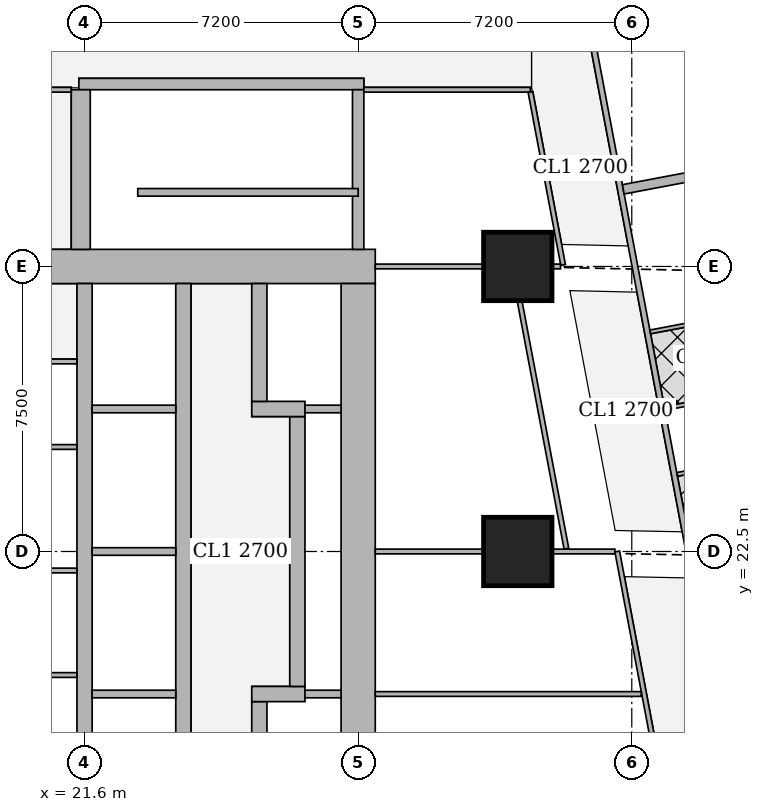
"""IFC4 building model, lengths in metres.
Left out: names, types, materials, properties, quantities, classifications, styles, units other than length and angle.
Written with IfcOpenShell. Run it as: python <this file> out.ifc"""

import sys

from ifc_helpers import new_model, si_unit, direction, frame, frame_2d, origin, origin_2d, place, context, subcontext, project, spatial, rectangle, extrude, element, fill, save


model = new_model("IFC4")
c1 = context("Model", 3, precision=1e-05, world=origin(), true_north=direction((0.0, 1.0)))
c2 = subcontext(c1, "Body", "Model", "MODEL_VIEW")
j1 = project(units=[si_unit("LENGTHUNIT", "METRE"), si_unit("PLANEANGLEUNIT", "RADIAN")], contexts=[c1])
p1 = place(None, origin())
s1 = spatial("IfcSite", under=j1, at=p1, CompositionType="ELEMENT")
p2 = place(p1, origin())
s2 = spatial("IfcBuilding", under=s1, at=p2, CompositionType="ELEMENT")
p3 = place(p2, frame((0.0, 0.0, 20.0)))
s3 = spatial("IfcBuildingStorey", under=s2, at=p3, CompositionType="ELEMENT", Elevation=20.0)
for number, where, z_axis, x_axis in (
    (1, (33.0, 22.5, 0.0), (0.0, 0.0, 1.0), (1.0, 0.0, 0.0)),
    (2, (33.0, 30.0, 0.0), (0.0, 0.0, 1.0), (1.0, 0.0, 0.0)),
):
    element("IfcColumn", number, at=place(p3, frame(where, z_axis=z_axis, x_axis=x_axis)), inside=s3, PredefinedType="COLUMN", context=c2, shape_type="SweptSolid", body=[
        extrude(rectangle(XDim=1.8, YDim=1.8, at=origin_2d()), origin(), (0.0, 0.0, 1.0), 3.75),
    ])
p4 = place(p3, frame((13.95, 30.0, 0.0), z_axis=(0.0, 0.0, 1.0), x_axis=(1.0, 0.0, 0.0)))
e3 = element("IfcWall", 3, at=p4, inside=s3, PredefinedType="SHEAR", context=c2, shape_type="SweptSolid", body=[
    extrude(rectangle(XDim=15.3, YDim=0.9, at=frame_2d((7.65, 0.0))), origin(), (0.0, 0.0, 1.0), 3.75),
])
p5 = place(p4, frame((4.45, 0.0, 0.0)))
e4 = element("IfcOpeningElement", 4, at=p5, cuts=e3, PredefinedType="OPENING", context=c2, shape_type="SweptSolid", body=[
    extrude(rectangle(XDim=1.8, YDim=2.1, at=frame_2d((0.9, 1.05))), frame((0.0, 0.46, 0.0), z_axis=(0.0, -1.0, 0.0), x_axis=(1.0, 0.0, 0.0)), (0.0, 0.0, 1.0), 0.92),
])
p6 = place(p4, frame((10.7, 0.0, 0.0)))
e5 = element("IfcOpeningElement", 5, at=p6, cuts=e3, PredefinedType="OPENING", context=c2, shape_type="SweptSolid", body=[
    extrude(rectangle(XDim=1.1, YDim=2.1, at=frame_2d((0.55, 1.05))), frame((0.0, 0.46, 0.0), z_axis=(0.0, -1.0, 0.0), x_axis=(1.0, 0.0, 0.0)), (0.0, 0.0, 1.0), 0.92),
])
p7 = place(p3, frame((28.8, 15.45, 0.0), z_axis=(0.0, 0.0, 1.0), x_axis=(0.0, 1.0, 0.0)))
e6 = element("IfcWall", 6, at=p7, inside=s3, PredefinedType="SHEAR", context=c2, shape_type="SweptSolid", body=[
    extrude(rectangle(XDim=14.1, YDim=0.9, at=frame_2d((7.05, 0.0))), origin(), (0.0, 0.0, 1.0), 3.75),
])
for number, where, z_axis, x_axis in (
    (7, (21.6, 15.45, 0.0), (0.0, 0.0, 1.0), (0.0, 1.0, 0.0)),
    (8, (24.2, 15.45, 0.0), (0.0, 0.0, 1.0), (0.0, 1.0, 0.0)),
):
    element("IfcWall", number, at=place(p3, frame(where, z_axis=z_axis, x_axis=x_axis)), inside=s3, PredefinedType="SHEAR", context=c2, shape_type="SweptSolid", body=[
        extrude(rectangle(XDim=14.1, YDim=0.4, at=frame_2d((7.05, 0.0))), origin(), (0.0, 0.0, 1.0), 3.75),
    ])
p8 = place(p3, frame((26.2, 15.45, 0.0), z_axis=(0.0, 0.0, 1.0), x_axis=(0.0, 1.0, 0.0)))
e9 = element("IfcWall", 9, at=p8, inside=s3, PredefinedType="SHEAR", context=c2, shape_type="SweptSolid", body=[
    extrude(rectangle(XDim=3.1, YDim=0.4, at=frame_2d((1.55, 0.0))), origin(), (0.0, 0.0, 1.0), 3.75),
])
p9 = place(p8, frame((0.825, 0.0, 0.0)))
e10 = element("IfcOpeningElement", 10, at=p9, cuts=e9, PredefinedType="OPENING", context=c2, shape_type="SweptSolid", body=[
    extrude(rectangle(XDim=1.2, YDim=2.1, at=frame_2d((0.6, 1.05))), frame((0.0, 0.21, 0.0), z_axis=(0.0, -1.0, 0.0), x_axis=(1.0, 0.0, 0.0)), (0.0, 0.0, 1.0), 0.42),
])
p10 = place(p3, frame((26.0, 18.75, 0.0), z_axis=(0.0, 0.0, 1.0), x_axis=(1.0, 0.0, 0.0)))
e11 = element("IfcWall", 11, at=p10, inside=s3, PredefinedType="SHEAR", context=c2, shape_type="SweptSolid", body=[
    extrude(rectangle(XDim=1.4, YDim=0.4, at=frame_2d((0.7, 0.0))), origin(), (0.0, 0.0, 1.0), 3.75),
])
p11 = place(p3, frame((27.2, 18.95, 0.0), z_axis=(0.0, 0.0, 1.0), x_axis=(0.0, 1.0, 0.0)))
e12 = element("IfcWall", 12, at=p11, inside=s3, PredefinedType="SHEAR", context=c2, shape_type="SweptSolid", body=[
    extrude(rectangle(XDim=7.1, YDim=0.4, at=frame_2d((3.55, 0.0))), origin(), (0.0, 0.0, 1.0), 3.75),
])
p12 = place(p3, frame((26.0, 26.25, 0.0), z_axis=(0.0, 0.0, 1.0), x_axis=(1.0, 0.0, 0.0)))
e13 = element("IfcWall", 13, at=p12, inside=s3, PredefinedType="SHEAR", context=c2, shape_type="SweptSolid", body=[
    extrude(rectangle(XDim=1.4, YDim=0.4, at=frame_2d((0.7, 0.0))), origin(), (0.0, 0.0, 1.0), 3.75),
])
p13 = place(p3, frame((26.2, 26.45, 0.0), z_axis=(0.0, 0.0, 1.0), x_axis=(0.0, 1.0, 0.0)))
e14 = element("IfcWall", 14, at=p13, inside=s3, PredefinedType="SHEAR", context=c2, shape_type="SweptSolid", body=[
    extrude(rectangle(XDim=3.1, YDim=0.4, at=frame_2d((1.55, 0.0))), origin(), (0.0, 0.0, 1.0), 3.75),
])
p14 = place(p13, frame((1.075, 0.0, 0.0)))
e15 = element("IfcOpeningElement", 15, at=p14, cuts=e14, PredefinedType="OPENING", context=c2, shape_type="SweptSolid", body=[
    extrude(rectangle(XDim=1.2, YDim=2.1, at=frame_2d((0.6, 1.05))), frame((0.0, 0.21, 0.0), z_axis=(0.0, -1.0, 0.0), x_axis=(1.0, 0.0, 0.0)), (0.0, 0.0, 1.0), 0.42),
])
p15 = place(p3, frame((21.45, 34.8, 0.0), z_axis=(0.0, 0.0, 1.0), x_axis=(1.0, 0.0, 0.0)))
e16 = element("IfcWall", 16, at=p15, inside=s3, PredefinedType="SHEAR", context=c2, shape_type="SweptSolid", body=[
    extrude(rectangle(XDim=7.5, YDim=0.3, at=frame_2d((3.75, 0.0))), origin(), (0.0, 0.0, 1.0), 3.75),
])
p16 = place(p15, frame((0.5, 0.0, 0.0)))
e17 = element("IfcOpeningElement", 17, at=p16, cuts=e16, PredefinedType="OPENING", context=c2, shape_type="SweptSolid", body=[
    extrude(rectangle(XDim=1.1, YDim=2.1, at=frame_2d((0.55, 1.05))), frame((0.0, 0.16, 0.0), z_axis=(0.0, -1.0, 0.0), x_axis=(1.0, 0.0, 0.0)), (0.0, 0.0, 1.0), 0.32),
])
p17 = place(p3, frame((21.5, 30.45, 0.0), z_axis=(0.0, 0.0, 1.0), x_axis=(0.0, 1.0, 0.0)))
e18 = element("IfcWall", 18, at=p17, inside=s3, PredefinedType="SHEAR", context=c2, shape_type="SweptSolid", body=[
    extrude(rectangle(XDim=4.2, YDim=0.5, at=frame_2d((2.1, 0.0))), origin(), (0.0, 0.0, 1.0), 3.75),
])
p18 = place(p3, frame((28.8, 30.45, 0.0), z_axis=(0.0, 0.0, 1.0), x_axis=(0.0, 1.0, 0.0)))
e19 = element("IfcWall", 19, at=p18, inside=s3, PredefinedType="SHEAR", context=c2, shape_type="SweptSolid", body=[
    extrude(rectangle(XDim=4.2, YDim=0.3, at=frame_2d((2.1, 0.0))), origin(), (0.0, 0.0, 1.0), 3.75),
])
p19 = place(p3, frame((33.755, 42.325, 0.0), z_axis=(0.0, 0.0, 1.0), x_axis=(0.185611461091, -0.982623216453, 0.0)))
e20 = element("IfcWall", 20, at=p19, inside=s3, PredefinedType="SOLIDWALL", context=c2, shape_type="SweptSolid", body=[
    extrude(rectangle(XDim=40.241, YDim=0.15, at=frame_2d((20.121, 0.0))), origin(), (0.0, 0.0, 1.0), 2.5),
])
p20 = place(p19, frame((7.325, 0.0, 0.0)))
e21 = element("IfcOpeningElement", 21, at=p20, cuts=e20, PredefinedType="OPENING", context=c2, shape_type="SweptSolid", body=[
    extrude(rectangle(XDim=1.0, YDim=2.1, at=frame_2d((0.5, 1.05))), frame((0.0, 0.085, 0.0), z_axis=(0.0, -1.0, 0.0), x_axis=(1.0, 0.0, 0.0)), (0.0, 0.0, 1.0), 0.17),
])
p21 = place(p19, frame((11.902, 0.0, 0.0)))
e22 = element("IfcOpeningElement", 22, at=p21, cuts=e20, PredefinedType="OPENING", context=c2, shape_type="SweptSolid", body=[
    extrude(rectangle(XDim=1.0, YDim=2.1, at=frame_2d((0.5, 1.05))), frame((0.0, 0.085, 0.0), z_axis=(0.0, -1.0, 0.0), x_axis=(1.0, 0.0, 0.0)), (0.0, 0.0, 1.0), 0.17),
])
p22 = place(p19, frame((25.718, 0.0, 0.0)))
e23 = element("IfcOpeningElement", 23, at=p22, cuts=e20, PredefinedType="OPENING", context=c2, shape_type="SweptSolid", body=[
    extrude(rectangle(XDim=1.0, YDim=2.1, at=frame_2d((0.5, 1.05))), frame((0.0, 0.085, 0.0), z_axis=(0.0, -1.0, 0.0), x_axis=(1.0, 0.0, 0.0)), (0.0, 0.0, 1.0), 0.17),
])
p23 = place(p19, frame((31.788, 0.0, 0.0)))
e24 = element("IfcOpeningElement", 24, at=p23, cuts=e20, PredefinedType="OPENING", context=c2, shape_type="SweptSolid", body=[
    extrude(rectangle(XDim=1.0, YDim=2.1, at=frame_2d((0.5, 1.05))), frame((0.0, 0.085, 0.0), z_axis=(0.0, -1.0, 0.0), x_axis=(1.0, 0.0, 0.0)), (0.0, 0.0, 1.0), 0.17),
])
for number, where, z_axis, x_axis in (
    (25, (39.948, 28.933, 0.0), (0.0, 0.0, 1.0), (-0.983, -0.186, 0.0)),
    (26, (40.656, 25.183, 0.0), (0.0, 0.0, 1.0), (-0.983, -0.186, 0.0)),
):
    element("IfcWall", number, at=place(p3, frame(where, z_axis=z_axis, x_axis=x_axis)), inside=s3, PredefinedType="PARTITIONING", context=c2, shape_type="SweptSolid", body=[
        extrude(rectangle(XDim=3.524, YDim=0.1, at=frame_2d((1.762, 0.0))), origin(), (0.0, 0.0, 1.0), 3.5),
    ])
p24 = place(p3, frame((40.329, 26.918, 0.0), z_axis=(0.0, 0.0, 1.0), x_axis=(-0.982638553676, -0.185530247748, 0.0)))
e27 = element("IfcWall", 27, at=p24, inside=s3, PredefinedType="PARTITIONING", context=c2, shape_type="SweptSolid", body=[
    extrude(rectangle(XDim=3.525, YDim=0.1, at=frame_2d((1.763, 0.0))), origin(), (0.0, 0.0, 1.0), 3.5),
])
p25 = place(p3, frame((40.468, 32.915, 0.0), z_axis=(0.0, 0.0, 1.0), x_axis=(-0.982635807605, -0.185544791394, 0.0)))
e28 = element("IfcWall", 28, at=p25, inside=s3, PredefinedType="SOLIDWALL", context=c2, shape_type="SweptSolid", body=[
    extrude(rectangle(XDim=4.775, YDim=0.25, at=frame_2d((2.388, 0.0))), origin(), (0.0, 0.0, 1.0), 3.5),
])
p26 = place(p3, frame((10.413, 34.65, 0.0), z_axis=(0.0, 0.0, 1.0), x_axis=(1.0, 0.0, 0.0)))
e29 = element("IfcWall", 29, at=p26, inside=s3, PredefinedType="PARTITIONING", context=c2, shape_type="SweptSolid", body=[
    extrude(rectangle(XDim=10.837, YDim=0.125, at=frame_2d((5.418, 0.0))), origin(), (0.0, 0.0, 1.0), 3.5),
])
p27 = place(p26, frame((7.487, 0.0, 0.0)))
e30 = element("IfcOpeningElement", 30, at=p27, cuts=e29, PredefinedType="OPENING", context=c2, shape_type="SweptSolid", body=[
    extrude(rectangle(XDim=1.8, YDim=2.1, at=frame_2d((0.9, 1.05))), frame((0.0, 0.073, 0.0), z_axis=(0.0, -1.0, 0.0), x_axis=(1.0, 0.0, 0.0)), (0.0, 0.0, 1.0), 0.145),
])
p28 = place(p3, frame((28.95, 34.65, 0.0), z_axis=(0.0, 0.0, 1.0), x_axis=(1.0, 0.0, 0.0)))
e31 = element("IfcWall", 31, at=p28, inside=s3, PredefinedType="PARTITIONING", context=c2, shape_type="SweptSolid", body=[
    extrude(rectangle(XDim=4.381, YDim=0.125, at=frame_2d((2.19, 0.0))), origin(), (0.0, 0.0, 1.0), 3.5),
])
p29 = place(p3, frame((36.861, 15.913, 0.0), z_axis=(0.0, 0.0, 1.0), x_axis=(-0.185598960122, 0.982625577726, 0.0)))
e32 = element("IfcWall", 32, at=p29, inside=s3, PredefinedType="PARTITIONING", context=c2, shape_type="SweptSolid", body=[
    extrude(rectangle(XDim=6.703, YDim=0.125, at=frame_2d((3.352, 0.0))), origin(), (0.0, 0.0, 1.0), 2.5),
])
p30 = place(p29, frame((0.25, 0.0, 0.0)))
e33 = element("IfcOpeningElement", 33, at=p30, cuts=e32, PredefinedType="OPENING", context=c2, shape_type="SweptSolid", body=[
    extrude(rectangle(XDim=1.0, YDim=2.1, at=frame_2d((0.5, 1.05))), frame((0.0, 0.073, 0.0), z_axis=(0.0, -1.0, 0.0), x_axis=(1.0, 0.0, 0.0)), (0.0, 0.0, 1.0), 0.145),
])
p31 = place(p29, frame((3.71, 0.0, 0.0)))
e34 = element("IfcOpeningElement", 34, at=p31, cuts=e32, PredefinedType="OPENING", context=c2, shape_type="SweptSolid", body=[
    extrude(rectangle(XDim=1.0, YDim=2.1, at=frame_2d((0.5, 1.05))), frame((0.0, 0.073, 0.0), z_axis=(0.0, -1.0, 0.0), x_axis=(1.0, 0.0, 0.0)), (0.0, 0.0, 1.0), 0.145),
])
p32 = place(p3, frame((34.193, 30.04, 0.0), z_axis=(0.0, 0.0, 1.0), x_axis=(-0.185626015863, 0.982620467034, 0.0)))
e35 = element("IfcWall", 35, at=p32, inside=s3, PredefinedType="PARTITIONING", context=c2, shape_type="SweptSolid", body=[
    extrude(rectangle(XDim=4.628, YDim=0.125, at=frame_2d((2.314, 0.0))), origin(), (0.0, 0.0, 1.0), 2.5),
])
p33 = place(p32, frame((1.15, 0.0, 0.0)))
e36 = element("IfcOpeningElement", 36, at=p33, cuts=e35, PredefinedType="OPENING", context=c2, shape_type="SweptSolid", body=[
    extrude(rectangle(XDim=1.0, YDim=2.1, at=frame_2d((0.5, 1.05))), frame((0.0, 0.073, 0.0), z_axis=(0.0, -1.0, 0.0), x_axis=(1.0, 0.0, 0.0)), (0.0, 0.0, 1.0), 0.145),
])
p34 = place(p3, frame((34.28, 22.574, 0.0), z_axis=(0.0, 0.0, 1.0), x_axis=(-0.185713862218, 0.982603867986, 0.0)))
e37 = element("IfcWall", 37, at=p34, inside=s3, PredefinedType="PARTITIONING", context=c2, shape_type="SweptSolid", body=[
    extrude(rectangle(XDim=6.628, YDim=0.125, at=frame_2d((3.314, 0.0))), origin(), (0.0, 0.0, 1.0), 2.5),
])
p35 = place(p34, frame((3.241, 0.0, 0.0)))
e38 = element("IfcOpeningElement", 38, at=p35, cuts=e37, PredefinedType="OPENING", context=c2, shape_type="SweptSolid", body=[
    extrude(rectangle(XDim=1.0, YDim=2.1, at=frame_2d((0.5, 1.05))), frame((0.0, 0.073, 0.0), z_axis=(0.0, -1.0, 0.0), x_axis=(1.0, 0.0, 0.0)), (0.0, 0.0, 1.0), 0.145),
])
p36 = place(p3, frame((29.25, 18.75, 0.0), z_axis=(0.0, 0.0, 1.0), x_axis=(1.0, 0.0, 0.0)))
e39 = element("IfcWall", 39, at=p36, inside=s3, PredefinedType="PARTITIONING", context=c2, shape_type="SweptSolid", body=[
    extrude(rectangle(XDim=7.0, YDim=0.125, at=frame_2d((3.5, 0.0))), origin(), (0.0, 0.0, 1.0), 3.5),
])
p37 = place(p3, frame((29.25, 22.5, 0.0), z_axis=(0.0, 0.0, 1.0), x_axis=(1.0, 0.0, 0.0)))
e40 = element("IfcWall", 40, at=p37, inside=s3, PredefinedType="PARTITIONING", context=c2, shape_type="SweptSolid", body=[
    extrude(rectangle(XDim=2.849, YDim=0.125, at=frame_2d((1.425, 0.0))), origin(), (0.0, 0.0, 1.0), 3.5),
])
p38 = place(p3, frame((33.901, 22.5, 0.0), z_axis=(0.0, 0.0, 1.0), x_axis=(1.0, 0.0, 0.0)))
e41 = element("IfcWall", 41, at=p38, inside=s3, PredefinedType="PARTITIONING", context=c2, shape_type="SweptSolid", body=[
    extrude(rectangle(XDim=1.655, YDim=0.125, at=frame_2d((0.828, 0.0))), origin(), (0.0, 0.0, 1.0), 2.5),
])
p39 = place(p3, frame((29.25, 30.0, 0.0), z_axis=(0.0, 0.0, 1.0), x_axis=(1.0, 0.0, 0.0)))
e42 = element("IfcWall", 42, at=p39, inside=s3, PredefinedType="PARTITIONING", context=c2, shape_type="SweptSolid", body=[
    extrude(rectangle(XDim=2.849, YDim=0.125, at=frame_2d((1.425, 0.0))), origin(), (0.0, 0.0, 1.0), 3.5),
])
p40 = place(p3, frame((33.901, 30.0, 0.0), z_axis=(0.0, 0.0, 1.0), x_axis=(1.0, 0.0, 0.0)))
e43 = element("IfcWall", 43, at=p40, inside=s3, PredefinedType="PARTITIONING", context=c2, shape_type="SweptSolid", body=[
    extrude(rectangle(XDim=0.224, YDim=0.125, at=frame_2d((0.112, 0.0))), origin(), (0.0, 0.0, 1.0), 2.5),
])
for number, where, z_axis, x_axis in (
    (44, (20.363, 27.5, 0.0), (0.0, 0.0, 1.0), (1.0, 0.0, 0.0)),
    (45, (20.363, 19.25, 0.0), (0.0, 0.0, 1.0), (1.0, 0.0, 0.0)),
    (46, (20.363, 22.0, 0.0), (0.0, 0.0, 1.0), (1.0, 0.0, 0.0)),
    (47, (20.363, 25.25, 0.0), (0.0, 0.0, 1.0), (1.0, 0.0, 0.0)),
):
    element("IfcWall", number, at=place(p3, frame(where, z_axis=z_axis, x_axis=x_axis)), inside=s3, PredefinedType="PARTITIONING", context=c2, shape_type="SweptSolid", body=[
        extrude(rectangle(XDim=1.037, YDim=0.125, at=frame_2d((0.519, 0.0))), origin(), (0.0, 0.0, 1.0), 3.5),
    ])
p41 = place(p3, frame((23.0, 31.95, 0.0), z_axis=(0.0, 0.0, 1.0), x_axis=(1.0, 0.0, 0.0)))
e48 = element("IfcWall", 48, at=p41, inside=s3, PredefinedType="SHEAR", context=c2, shape_type="SweptSolid", body=[
    extrude(rectangle(XDim=5.8, YDim=0.2, at=frame_2d((2.9, 0.0))), origin(), (0.0, 0.0, 1.0), 3.75),
])
for number, where, z_axis, x_axis in (
    (49, (21.8, 18.75, 0.0), (0.0, 0.0, 1.0), (1.0, 0.0, 0.0)),
    (50, (21.8, 22.5, 0.0), (0.0, 0.0, 1.0), (1.0, 0.0, 0.0)),
    (51, (21.8, 26.25, 0.0), (0.0, 0.0, 1.0), (1.0, 0.0, 0.0)),
):
    element("IfcWall", number, at=place(p3, frame(where, z_axis=z_axis, x_axis=x_axis)), inside=s3, PredefinedType="SOLIDWALL", context=c2, shape_type="SweptSolid", body=[
        extrude(rectangle(XDim=2.2, YDim=0.2, at=frame_2d((1.1, 0.0))), origin(), (0.0, 0.0, 1.0), 3.5),
    ])
for number, where, z_axis, x_axis in (
    (52, (27.4, 18.75, 0.0), (0.0, 0.0, 1.0), (1.0, 0.0, 0.0)),
    (53, (27.4, 26.25, 0.0), (0.0, 0.0, 1.0), (1.0, 0.0, 0.0)),
):
    element("IfcWall", number, at=place(p3, frame(where, z_axis=z_axis, x_axis=x_axis)), inside=s3, PredefinedType="SOLIDWALL", context=c2, shape_type="SweptSolid", body=[
        extrude(rectangle(XDim=0.95, YDim=0.2, at=frame_2d((0.475, 0.0))), origin(), (0.0, 0.0, 1.0), 3.5),
    ])
p42 = place(p20, origin())
e54 = element("IfcDoor", 54, at=p42, inside=s3, OperationType="SINGLE_SWING_RIGHT", PredefinedType="DOOR", context=c2, shape_type="SweptSolid", body=[
    extrude(rectangle(XDim=1.0, YDim=2.1, at=frame_2d((0.5, 1.05))), frame((0.0, 0.025, 0.0), z_axis=(0.0, -1.0, 0.0), x_axis=(1.0, 0.0, 0.0)), (0.0, 0.0, 1.0), 0.05),
])
fill(e21, e54)
p43 = place(p21, origin())
e55 = element("IfcDoor", 55, at=p43, inside=s3, OperationType="SINGLE_SWING_LEFT", PredefinedType="DOOR", context=c2, shape_type="SweptSolid", body=[
    extrude(rectangle(XDim=1.0, YDim=2.1, at=frame_2d((0.5, 1.05))), frame((0.0, 0.025, 0.0), z_axis=(0.0, -1.0, 0.0), x_axis=(1.0, 0.0, 0.0)), (0.0, 0.0, 1.0), 0.05),
])
fill(e22, e55)
p44 = place(p31, origin())
e56 = element("IfcDoor", 56, at=p44, inside=s3, OperationType="SINGLE_SWING_LEFT", PredefinedType="DOOR", context=c2, shape_type="SweptSolid", body=[
    extrude(rectangle(XDim=1.0, YDim=2.1, at=frame_2d((0.5, 1.05))), frame((0.0, 0.025, 0.0), z_axis=(0.0, -1.0, 0.0), x_axis=(1.0, 0.0, 0.0)), (0.0, 0.0, 1.0), 0.05),
])
fill(e34, e56)
p45 = place(p35, origin())
e57 = element("IfcDoor", 57, at=p45, inside=s3, OperationType="SINGLE_SWING_RIGHT", PredefinedType="DOOR", context=c2, shape_type="SweptSolid", body=[
    extrude(rectangle(XDim=1.0, YDim=2.1, at=frame_2d((0.5, 1.05))), frame((0.0, 0.025, 0.0), z_axis=(0.0, -1.0, 0.0), x_axis=(1.0, 0.0, 0.0)), (0.0, 0.0, 1.0), 0.05),
])
fill(e38, e57)
p46 = place(p33, origin())
e58 = element("IfcDoor", 58, at=p46, inside=s3, OperationType="SINGLE_SWING_LEFT", PredefinedType="DOOR", context=c2, shape_type="SweptSolid", body=[
    extrude(rectangle(XDim=1.0, YDim=2.1, at=frame_2d((0.5, 1.05))), frame((0.0, 0.025, 0.0), z_axis=(0.0, -1.0, 0.0), x_axis=(1.0, 0.0, 0.0)), (0.0, 0.0, 1.0), 0.05),
])
fill(e36, e58)
p47 = place(p6, origin())
e59 = element("IfcDoor", 59, at=p47, inside=s3, OperationType="SINGLE_SWING_RIGHT", PredefinedType="DOOR", context=c2, shape_type="SweptSolid", body=[
    extrude(rectangle(XDim=1.1, YDim=2.1, at=frame_2d((0.55, 1.05))), frame((0.0, 0.025, 0.0), z_axis=(0.0, -1.0, 0.0), x_axis=(1.0, 0.0, 0.0)), (0.0, 0.0, 1.0), 0.05),
])
fill(e5, e59)
p48 = place(p14, origin())
e60 = element("IfcDoor", 60, at=p48, inside=s3, OperationType="DOUBLE_DOOR_SLIDING", PredefinedType="DOOR", context=c2, shape_type="SweptSolid", body=[
    extrude(rectangle(XDim=1.2, YDim=2.1, at=frame_2d((0.6, 1.05))), frame((0.0, 0.025, 0.0), z_axis=(0.0, -1.0, 0.0), x_axis=(1.0, 0.0, 0.0)), (0.0, 0.0, 1.0), 0.05),
])
fill(e15, e60)
p49 = place(p16, origin())
e61 = element("IfcDoor", 61, at=p49, inside=s3, OperationType="SINGLE_SWING_RIGHT", PredefinedType="DOOR", context=c2, shape_type="SweptSolid", body=[
    extrude(rectangle(XDim=1.1, YDim=2.1, at=frame_2d((0.55, 1.05))), frame((0.0, 0.025, 0.0), z_axis=(0.0, -1.0, 0.0), x_axis=(1.0, 0.0, 0.0)), (0.0, 0.0, 1.0), 0.05),
])
fill(e17, e61)
save(model, sys.argv[1])
